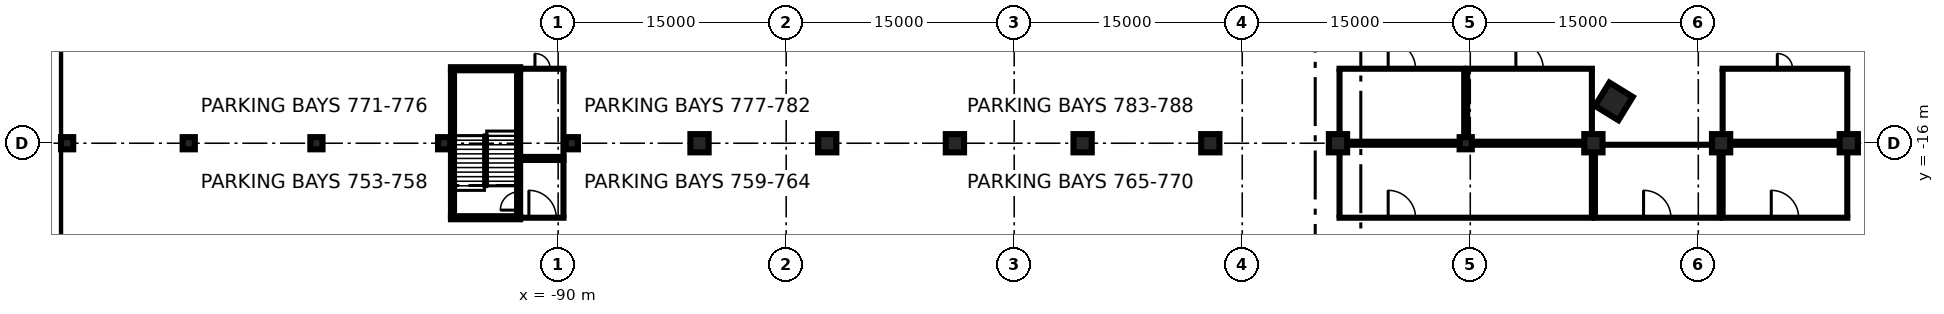
"""IFC4 building model, lengths in metres.
Left out: names, types, materials, properties, quantities, classifications, styles, units other than length and angle.
Written with IfcOpenShell. Run it as: python <this file> out.ifc"""

import sys

from ifc_helpers import new_model, si_unit, direction, frame, frame_2d, origin, origin_2d, place, context, subcontext, project, spatial, rectangle, extrude, element, fill, save


model = new_model("IFC4")
c1 = context("Model", 3, precision=1e-05, world=origin(), true_north=direction((0.0, 1.0)))
c2 = subcontext(c1, "Body", "Model", "MODEL_VIEW")
j1 = project(units=[si_unit("LENGTHUNIT", "METRE"), si_unit("PLANEANGLEUNIT", "RADIAN")], contexts=[c1])
p1 = place(None, origin())
s1 = spatial("IfcSite", under=j1, at=p1, CompositionType="ELEMENT")
p2 = place(p1, origin())
s2 = spatial("IfcBuilding", under=s1, at=p2, CompositionType="ELEMENT")
p3 = place(p2, frame((0.0, 0.0, -12.0)))
s3 = spatial("IfcBuildingStorey", under=s2, at=p3, CompositionType="ELEMENT", Elevation=-12.0)
p4 = place(p3, frame((-123.15, -80.0, 0.0), z_axis=(0.0, 0.0, 1.0), x_axis=(0.0, 1.0, 0.0)))
e1 = element("IfcWall", 1, at=p4, inside=s3, PredefinedType="USERDEFINED", context=c2, shape_type="SweptSolid", body=[
    extrude(rectangle(XDim=160.0, YDim=0.9, at=frame_2d((80.0, 0.0))), origin(), (0.0, 0.0, 1.0), 11.55),
])
p5 = place(p2, frame((0.0, 0.0, -7.2)))
s4 = spatial("IfcBuildingStorey", under=s2, at=p5, CompositionType="ELEMENT", Elevation=-7.2)
p6 = place(p5, frame((-20.552, -13.248, -0.4), z_axis=(0.0, 0.0, 1.0), x_axis=(0.523429826947, 0.85206878611, 0.0)))
e2 = element("IfcColumn", 2, at=p6, inside=s4, PredefinedType="COLUMN", context=c2, shape_type="SweptSolid", body=[
    extrude(rectangle(XDim=1.8, YDim=1.8, at=origin_2d()), origin(), (0.0, 0.0, 1.0), 3.6),
])
for number, where, z_axis, x_axis in (
    (3, (-122.3, -16.0, -0.4), (0.0, 0.0, 1.0), (1.0, 0.0, 0.0)),
    (4, (-114.3, -16.0, -0.4), (0.0, 0.0, 1.0), (1.0, 0.0, 0.0)),
    (5, (-105.9, -16.0, -0.4), (0.0, 0.0, 1.0), (1.0, 0.0, 0.0)),
    (6, (-97.5, -16.0, -0.4), (0.0, 0.0, 1.0), (1.0, 0.0, 0.0)),
    (7, (-89.1, -16.0, -0.4), (0.0, 0.0, 1.0), (1.0, 0.0, 0.0)),
):
    element("IfcColumn", number, at=place(p5, frame(where, z_axis=z_axis, x_axis=x_axis)), inside=s4, PredefinedType="COLUMN", context=c2, shape_type="SweptSolid", body=[
        extrude(rectangle(XDim=0.8, YDim=0.8, at=origin_2d()), origin(), (0.0, 0.0, 1.0), 3.6),
    ])
for number, where, z_axis, x_axis in (
    (8, (-80.7, -16.0, -0.4), (0.0, 0.0, 1.0), (1.0, 0.0, 0.0)),
    (9, (-72.3, -16.0, -0.4), (0.0, 0.0, 1.0), (1.0, 0.0, 0.0)),
    (10, (-63.9, -16.0, -0.4), (0.0, 0.0, 1.0), (1.0, 0.0, 0.0)),
    (11, (-55.5, -16.0, -0.4), (0.0, 0.0, 1.0), (1.0, 0.0, 0.0)),
    (12, (-47.1, -16.0, -0.4), (0.0, 0.0, 1.0), (1.0, 0.0, 0.0)),
    (13, (-38.7, -16.0, -0.4), (0.0, 0.0, 1.0), (1.0, 0.0, 0.0)),
):
    element("IfcColumn", number, at=place(p5, frame(where, z_axis=z_axis, x_axis=x_axis)), inside=s4, PredefinedType="COLUMN", context=c2, shape_type="SweptSolid", body=[
        extrude(rectangle(XDim=1.2, YDim=1.2, at=origin_2d()), origin(), (0.0, 0.0, 1.0), 3.6),
    ])
p7 = place(p5, frame((-30.3, -16.0, -0.4), z_axis=(0.0, 0.0, 1.0), x_axis=(1.0, 0.0, 0.0)))
e14 = element("IfcColumn", 14, at=p7, inside=s4, PredefinedType="COLUMN", context=c2, shape_type="SweptSolid", body=[
    extrude(rectangle(XDim=0.8, YDim=0.8, at=origin_2d()), origin(), (0.0, 0.0, 1.0), 3.6),
])
for number, where, z_axis, x_axis in (
    (15, (-21.9, -16.0, -0.4), (0.0, 0.0, 1.0), (1.0, 0.0, 0.0)),
    (16, (-13.5, -16.0, -0.4), (0.0, 0.0, 1.0), (1.0, 0.0, 0.0)),
    (17, (-5.1, -16.0, -0.4), (0.0, 0.0, 1.0), (1.0, 0.0, 0.0)),
):
    element("IfcColumn", number, at=place(p5, frame(where, z_axis=z_axis, x_axis=x_axis)), inside=s4, PredefinedType="COLUMN", context=c2, shape_type="SweptSolid", body=[
        extrude(rectangle(XDim=1.2, YDim=1.2, at=origin_2d()), origin(), (0.0, 0.0, 1.0), 3.6),
    ])
p8 = place(p5, frame((-38.7, -20.9, 0.0), z_axis=(0.0, 0.0, 1.0), x_axis=(1.0, 0.0, 0.0)))
e18 = element("IfcWall", 18, at=p8, inside=s4, PredefinedType="PARTITIONING", context=c2, shape_type="SweptSolid", body=[
    extrude(rectangle(XDim=16.8, YDim=0.2, at=frame_2d((8.4, 0.0))), origin(), (0.0, 0.0, 1.0), 3.2),
])
p9 = place(p8, frame((3.3, 0.0, 0.0)))
e19 = element("IfcOpeningElement", 19, at=p9, cuts=e18, PredefinedType="OPENING", context=c2, shape_type="SweptSolid", body=[
    extrude(rectangle(XDim=1.8, YDim=2.1, at=frame_2d((0.9, 1.05))), frame((0.0, 0.11, 0.0), z_axis=(0.0, -1.0, 0.0), x_axis=(1.0, 0.0, 0.0)), (0.0, 0.0, 1.0), 0.22),
])
p10 = place(p5, frame((-38.7, -16.1, 0.0), z_axis=(0.0, 0.0, 1.0), x_axis=(1.0, 0.0, 0.0)))
e20 = element("IfcWall", 20, at=p10, inside=s4, PredefinedType="PARTITIONING", context=c2, shape_type="SweptSolid", body=[
    extrude(rectangle(XDim=16.8, YDim=0.2, at=frame_2d((8.4, 0.0))), origin(), (0.0, 0.0, 1.0), 3.2),
])
for number, where, z_axis, x_axis in (
    (21, (-38.6, -20.8, 0.0), (0.0, 0.0, 1.0), (0.0, 1.0, 0.0)),
    (22, (-22.0, -20.8, 0.0), (0.0, 0.0, 1.0), (0.0, 1.0, 0.0)),
):
    element("IfcWall", number, at=place(p5, frame(where, z_axis=z_axis, x_axis=x_axis)), inside=s4, PredefinedType="PARTITIONING", context=c2, shape_type="SweptSolid", body=[
        extrude(rectangle(XDim=4.2, YDim=0.2, at=frame_2d((2.1, 0.0))), origin(), (0.0, 0.0, 1.0), 3.2),
    ])
p11 = place(p5, frame((-21.9, -20.9, 0.0), z_axis=(0.0, 0.0, 1.0), x_axis=(1.0, 0.0, 0.0)))
e23 = element("IfcWall", 23, at=p11, inside=s4, PredefinedType="PARTITIONING", context=c2, shape_type="SweptSolid", body=[
    extrude(rectangle(XDim=8.4, YDim=0.2, at=frame_2d((4.2, 0.0))), origin(), (0.0, 0.0, 1.0), 3.2),
])
p12 = place(p11, frame((3.3, 0.0, 0.0)))
e24 = element("IfcOpeningElement", 24, at=p12, cuts=e23, PredefinedType="OPENING", context=c2, shape_type="SweptSolid", body=[
    extrude(rectangle(XDim=1.8, YDim=2.1, at=frame_2d((0.9, 1.05))), frame((0.0, 0.11, 0.0), z_axis=(0.0, -1.0, 0.0), x_axis=(1.0, 0.0, 0.0)), (0.0, 0.0, 1.0), 0.22),
])
p13 = place(p5, frame((-21.9, -16.1, 0.0), z_axis=(0.0, 0.0, 1.0), x_axis=(1.0, 0.0, 0.0)))
e25 = element("IfcWall", 25, at=p13, inside=s4, PredefinedType="PARTITIONING", context=c2, shape_type="SweptSolid", body=[
    extrude(rectangle(XDim=8.4, YDim=0.2, at=frame_2d((4.2, 0.0))), origin(), (0.0, 0.0, 1.0), 3.2),
])
for number, where, z_axis, x_axis in (
    (26, (-21.8, -20.8, 0.0), (0.0, 0.0, 1.0), (0.0, 1.0, 0.0)),
    (27, (-13.6, -20.8, 0.0), (0.0, 0.0, 1.0), (0.0, 1.0, 0.0)),
):
    element("IfcWall", number, at=place(p5, frame(where, z_axis=z_axis, x_axis=x_axis)), inside=s4, PredefinedType="PARTITIONING", context=c2, shape_type="SweptSolid", body=[
        extrude(rectangle(XDim=4.2, YDim=0.2, at=frame_2d((2.1, 0.0))), origin(), (0.0, 0.0, 1.0), 3.2),
    ])
p14 = place(p5, frame((-13.5, -20.9, 0.0), z_axis=(0.0, 0.0, 1.0), x_axis=(1.0, 0.0, 0.0)))
e28 = element("IfcWall", 28, at=p14, inside=s4, PredefinedType="PARTITIONING", context=c2, shape_type="SweptSolid", body=[
    extrude(rectangle(XDim=8.4, YDim=0.2, at=frame_2d((4.2, 0.0))), origin(), (0.0, 0.0, 1.0), 3.2),
])
p15 = place(p14, frame((3.3, 0.0, 0.0)))
e29 = element("IfcOpeningElement", 29, at=p15, cuts=e28, PredefinedType="OPENING", context=c2, shape_type="SweptSolid", body=[
    extrude(rectangle(XDim=1.8, YDim=2.1, at=frame_2d((0.9, 1.05))), frame((0.0, 0.11, 0.0), z_axis=(0.0, -1.0, 0.0), x_axis=(1.0, 0.0, 0.0)), (0.0, 0.0, 1.0), 0.22),
])
p16 = place(p5, frame((-13.5, -16.1, 0.0), z_axis=(0.0, 0.0, 1.0), x_axis=(1.0, 0.0, 0.0)))
e30 = element("IfcWall", 30, at=p16, inside=s4, PredefinedType="PARTITIONING", context=c2, shape_type="SweptSolid", body=[
    extrude(rectangle(XDim=8.4, YDim=0.2, at=frame_2d((4.2, 0.0))), origin(), (0.0, 0.0, 1.0), 3.2),
])
for number, where, z_axis, x_axis in (
    (31, (-13.4, -20.8, 0.0), (0.0, 0.0, 1.0), (0.0, 1.0, 0.0)),
    (32, (-5.2, -20.8, 0.0), (0.0, 0.0, 1.0), (0.0, 1.0, 0.0)),
):
    element("IfcWall", number, at=place(p5, frame(where, z_axis=z_axis, x_axis=x_axis)), inside=s4, PredefinedType="PARTITIONING", context=c2, shape_type="SweptSolid", body=[
        extrude(rectangle(XDim=4.2, YDim=0.2, at=frame_2d((2.1, 0.0))), origin(), (0.0, 0.0, 1.0), 3.2),
    ])
p17 = place(p5, frame((-38.7, -15.9, 0.0), z_axis=(0.0, 0.0, 1.0), x_axis=(1.0, 0.0, 0.0)))
e33 = element("IfcWall", 33, at=p17, inside=s4, PredefinedType="PARTITIONING", context=c2, shape_type="SweptSolid", body=[
    extrude(rectangle(XDim=8.4, YDim=0.2, at=frame_2d((4.2, 0.0))), origin(), (0.0, 0.0, 1.0), 3.2),
])
p18 = place(p5, frame((-38.7, -11.1, 0.0), z_axis=(0.0, 0.0, 1.0), x_axis=(1.0, 0.0, 0.0)))
e34 = element("IfcWall", 34, at=p18, inside=s4, PredefinedType="PARTITIONING", context=c2, shape_type="SweptSolid", body=[
    extrude(rectangle(XDim=8.4, YDim=0.2, at=frame_2d((4.2, 0.0))), origin(), (0.0, 0.0, 1.0), 3.2),
])
p19 = place(p18, frame((3.3, 0.0, 0.0)))
e35 = element("IfcOpeningElement", 35, at=p19, cuts=e34, PredefinedType="OPENING", context=c2, shape_type="SweptSolid", body=[
    extrude(rectangle(XDim=1.8, YDim=2.1, at=frame_2d((0.9, 1.05))), frame((0.0, 0.11, 0.0), z_axis=(0.0, -1.0, 0.0), x_axis=(1.0, 0.0, 0.0)), (0.0, 0.0, 1.0), 0.22),
])
p20 = place(p5, frame((-38.6, -15.4, 0.0), z_axis=(0.0, 0.0, 1.0), x_axis=(0.0, 1.0, 0.0)))
e36 = element("IfcWall", 36, at=p20, inside=s4, PredefinedType="PARTITIONING", context=c2, shape_type="SweptSolid", body=[
    extrude(rectangle(XDim=4.2, YDim=0.2, at=frame_2d((2.1, 0.0))), origin(), (0.0, 0.0, 1.0), 3.2),
])
p21 = place(p5, frame((-30.4, -15.6, 0.0), z_axis=(0.0, 0.0, 1.0), x_axis=(0.0, 1.0, 0.0)))
e37 = element("IfcWall", 37, at=p21, inside=s4, PredefinedType="PARTITIONING", context=c2, shape_type="SweptSolid", body=[
    extrude(rectangle(XDim=4.4, YDim=0.2, at=frame_2d((2.2, 0.0))), origin(), (0.0, 0.0, 1.0), 3.2),
])
p22 = place(p5, frame((-30.3, -15.9, 0.0), z_axis=(0.0, 0.0, 1.0), x_axis=(1.0, 0.0, 0.0)))
e38 = element("IfcWall", 38, at=p22, inside=s4, PredefinedType="PARTITIONING", context=c2, shape_type="SweptSolid", body=[
    extrude(rectangle(XDim=8.4, YDim=0.2, at=frame_2d((4.2, 0.0))), origin(), (0.0, 0.0, 1.0), 3.2),
])
p23 = place(p5, frame((-30.3, -11.1, 0.0), z_axis=(0.0, 0.0, 1.0), x_axis=(1.0, 0.0, 0.0)))
e39 = element("IfcWall", 39, at=p23, inside=s4, PredefinedType="PARTITIONING", context=c2, shape_type="SweptSolid", body=[
    extrude(rectangle(XDim=8.4, YDim=0.2, at=frame_2d((4.2, 0.0))), origin(), (0.0, 0.0, 1.0), 3.2),
])
p24 = place(p23, frame((3.3, 0.0, 0.0)))
e40 = element("IfcOpeningElement", 40, at=p24, cuts=e39, PredefinedType="OPENING", context=c2, shape_type="SweptSolid", body=[
    extrude(rectangle(XDim=1.8, YDim=2.1, at=frame_2d((0.9, 1.05))), frame((0.0, 0.11, 0.0), z_axis=(0.0, -1.0, 0.0), x_axis=(1.0, 0.0, 0.0)), (0.0, 0.0, 1.0), 0.22),
])
p25 = place(p5, frame((-30.2, -15.6, 0.0), z_axis=(0.0, 0.0, 1.0), x_axis=(0.0, 1.0, 0.0)))
e41 = element("IfcWall", 41, at=p25, inside=s4, PredefinedType="PARTITIONING", context=c2, shape_type="SweptSolid", body=[
    extrude(rectangle(XDim=4.4, YDim=0.2, at=frame_2d((2.2, 0.0))), origin(), (0.0, 0.0, 1.0), 3.2),
])
p26 = place(p5, frame((-22.0, -15.4, 0.0), z_axis=(0.0, 0.0, 1.0), x_axis=(0.0, 1.0, 0.0)))
e42 = element("IfcWall", 42, at=p26, inside=s4, PredefinedType="PARTITIONING", context=c2, shape_type="SweptSolid", body=[
    extrude(rectangle(XDim=4.2, YDim=0.2, at=frame_2d((2.1, 0.0))), origin(), (0.0, 0.0, 1.0), 3.2),
])
p27 = place(p5, frame((-13.5, -15.9, 0.0), z_axis=(0.0, 0.0, 1.0), x_axis=(1.0, 0.0, 0.0)))
e43 = element("IfcWall", 43, at=p27, inside=s4, PredefinedType="PARTITIONING", context=c2, shape_type="SweptSolid", body=[
    extrude(rectangle(XDim=8.4, YDim=0.2, at=frame_2d((4.2, 0.0))), origin(), (0.0, 0.0, 1.0), 3.2),
])
p28 = place(p5, frame((-13.5, -11.1, 0.0), z_axis=(0.0, 0.0, 1.0), x_axis=(1.0, 0.0, 0.0)))
e44 = element("IfcWall", 44, at=p28, inside=s4, PredefinedType="PARTITIONING", context=c2, shape_type="SweptSolid", body=[
    extrude(rectangle(XDim=8.4, YDim=0.2, at=frame_2d((4.2, 0.0))), origin(), (0.0, 0.0, 1.0), 3.2),
])
p29 = place(p28, frame((3.7, 0.0, 0.0)))
e45 = element("IfcOpeningElement", 45, at=p29, cuts=e44, PredefinedType="OPENING", context=c2, shape_type="SweptSolid", body=[
    extrude(rectangle(XDim=1.0, YDim=2.1, at=frame_2d((0.5, 1.05))), frame((0.0, 0.11, 0.0), z_axis=(0.0, -1.0, 0.0), x_axis=(1.0, 0.0, 0.0)), (0.0, 0.0, 1.0), 0.22),
])
for number, where, z_axis, x_axis in (
    (46, (-13.4, -15.4, 0.0), (0.0, 0.0, 1.0), (0.0, 1.0, 0.0)),
    (47, (-5.2, -15.4, 0.0), (0.0, 0.0, 1.0), (0.0, 1.0, 0.0)),
):
    element("IfcWall", number, at=place(p5, frame(where, z_axis=z_axis, x_axis=x_axis)), inside=s4, PredefinedType="PARTITIONING", context=c2, shape_type="SweptSolid", body=[
        extrude(rectangle(XDim=4.2, YDim=0.2, at=frame_2d((2.1, 0.0))), origin(), (0.0, 0.0, 1.0), 3.2),
    ])
p30 = place(p5, frame((-92.5, -20.9, 0.0), z_axis=(0.0, 0.0, 1.0), x_axis=(1.0, 0.0, 0.0)))
e48 = element("IfcWall", 48, at=p30, inside=s4, PredefinedType="PARTITIONING", context=c2, shape_type="SweptSolid", body=[
    extrude(rectangle(XDim=2.95, YDim=0.2, at=frame_2d((1.475, 0.0))), origin(), (0.0, 0.0, 1.0), 3.2),
])
p31 = place(p30, frame((0.575, 0.0, 0.0)))
e49 = element("IfcOpeningElement", 49, at=p31, cuts=e48, PredefinedType="OPENING", context=c2, shape_type="SweptSolid", body=[
    extrude(rectangle(XDim=1.8, YDim=2.1, at=frame_2d((0.9, 1.05))), frame((0.0, 0.11, 0.0), z_axis=(0.0, -1.0, 0.0), x_axis=(1.0, 0.0, 0.0)), (0.0, 0.0, 1.0), 0.22),
])
p32 = place(p5, frame((-92.5, -17.1, 0.0), z_axis=(0.0, 0.0, 1.0), x_axis=(1.0, 0.0, 0.0)))
e50 = element("IfcWall", 50, at=p32, inside=s4, PredefinedType="PARTITIONING", context=c2, shape_type="SweptSolid", body=[
    extrude(rectangle(XDim=2.95, YDim=0.2, at=frame_2d((1.475, 0.0))), origin(), (0.0, 0.0, 1.0), 3.2),
])
p33 = place(p5, frame((-89.65, -20.8, 0.0), z_axis=(0.0, 0.0, 1.0), x_axis=(0.0, 1.0, 0.0)))
e51 = element("IfcWall", 51, at=p33, inside=s4, PredefinedType="PARTITIONING", context=c2, shape_type="SweptSolid", body=[
    extrude(rectangle(XDim=3.6, YDim=0.2, at=frame_2d((1.8, 0.0))), origin(), (0.0, 0.0, 1.0), 3.2),
])
p34 = place(p5, frame((-92.5, -16.9, 0.0), z_axis=(0.0, 0.0, 1.0), x_axis=(1.0, 0.0, 0.0)))
e52 = element("IfcWall", 52, at=p34, inside=s4, PredefinedType="PARTITIONING", context=c2, shape_type="SweptSolid", body=[
    extrude(rectangle(XDim=2.95, YDim=0.2, at=frame_2d((1.475, 0.0))), origin(), (0.0, 0.0, 1.0), 3.2),
])
p35 = place(p5, frame((-92.5, -11.1, 0.0), z_axis=(0.0, 0.0, 1.0), x_axis=(1.0, 0.0, 0.0)))
e53 = element("IfcWall", 53, at=p35, inside=s4, PredefinedType="PARTITIONING", context=c2, shape_type="SweptSolid", body=[
    extrude(rectangle(XDim=2.95, YDim=0.2, at=frame_2d((1.475, 0.0))), origin(), (0.0, 0.0, 1.0), 3.2),
])
p36 = place(p35, frame((0.975, 0.0, 0.0)))
e54 = element("IfcOpeningElement", 54, at=p36, cuts=e53, PredefinedType="OPENING", context=c2, shape_type="SweptSolid", body=[
    extrude(rectangle(XDim=1.0, YDim=2.1, at=frame_2d((0.5, 1.05))), frame((0.0, 0.11, 0.0), z_axis=(0.0, -1.0, 0.0), x_axis=(1.0, 0.0, 0.0)), (0.0, 0.0, 1.0), 0.22),
])
p37 = place(p5, frame((-89.65, -16.8, 0.0), z_axis=(0.0, 0.0, 1.0), x_axis=(0.0, 1.0, 0.0)))
e55 = element("IfcWall", 55, at=p37, inside=s4, PredefinedType="PARTITIONING", context=c2, shape_type="SweptSolid", body=[
    extrude(rectangle(XDim=5.6, YDim=0.2, at=frame_2d((2.8, 0.0))), origin(), (0.0, 0.0, 1.0), 3.2),
])
p38 = place(p5, frame((-96.95, -20.8, 0.0), z_axis=(0.0, 0.0, 1.0), x_axis=(0.0, 1.0, 0.0)))
e56 = element("IfcWall", 56, at=p38, inside=s4, PredefinedType="SOLIDWALL", context=c2, shape_type="SweptSolid", body=[
    extrude(rectangle(XDim=9.6, YDim=0.2, at=frame_2d((4.8, 0.0))), origin(), (0.0, 0.0, 1.0), 3.2),
])
p39 = place(p5, frame((-92.6, -20.8, 0.0), z_axis=(0.0, 0.0, 1.0), x_axis=(0.0, 1.0, 0.0)))
e57 = element("IfcWall", 57, at=p39, inside=s4, PredefinedType="SOLIDWALL", context=c2, shape_type="SweptSolid", body=[
    extrude(rectangle(XDim=9.6, YDim=0.2, at=frame_2d((4.8, 0.0))), origin(), (0.0, 0.0, 1.0), 3.2),
])
p40 = place(p39, frame((0.4, 0.0, 0.0)))
e58 = element("IfcOpeningElement", 58, at=p40, cuts=e57, PredefinedType="OPENING", context=c2, shape_type="SweptSolid", body=[
    extrude(rectangle(XDim=1.2, YDim=2.1, at=frame_2d((0.6, 1.05))), frame((0.0, 0.11, 0.0), z_axis=(0.0, -1.0, 0.0), x_axis=(1.0, 0.0, 0.0)), (0.0, 0.0, 1.0), 0.22),
])
for number, where, z_axis, x_axis in (
    (59, (-92.5, -20.9, 0.0), (0.0, 0.0, 1.0), (-1.0, 0.0, 0.0)),
    (60, (-97.05, -11.1, 0.0), (0.0, 0.0, 1.0), (1.0, 0.0, 0.0)),
):
    element("IfcWall", number, at=place(p5, frame(where, z_axis=z_axis, x_axis=x_axis)), inside=s4, PredefinedType="SOLIDWALL", context=c2, shape_type="SweptSolid", body=[
        extrude(rectangle(XDim=4.55, YDim=0.2, at=frame_2d((2.275, 0.0))), origin(), (0.0, 0.0, 1.0), 3.2),
    ])
p41 = place(p9, origin())
e61 = element("IfcDoor", 61, at=p41, inside=s4, OperationType="DOUBLE_DOOR_SINGLE_SWING", PredefinedType="DOOR", context=c2, shape_type="SweptSolid", body=[
    extrude(rectangle(XDim=1.8, YDim=2.1, at=frame_2d((0.9, 1.05))), frame((0.0, 0.025, 0.0), z_axis=(0.0, -1.0, 0.0), x_axis=(1.0, 0.0, 0.0)), (0.0, 0.0, 1.0), 0.05),
])
fill(e19, e61)
p42 = place(p12, origin())
e62 = element("IfcDoor", 62, at=p42, inside=s4, OperationType="DOUBLE_DOOR_SINGLE_SWING", PredefinedType="DOOR", context=c2, shape_type="SweptSolid", body=[
    extrude(rectangle(XDim=1.8, YDim=2.1, at=frame_2d((0.9, 1.05))), frame((0.0, 0.025, 0.0), z_axis=(0.0, -1.0, 0.0), x_axis=(1.0, 0.0, 0.0)), (0.0, 0.0, 1.0), 0.05),
])
fill(e24, e62)
p43 = place(p15, origin())
e63 = element("IfcDoor", 63, at=p43, inside=s4, OperationType="DOUBLE_DOOR_SINGLE_SWING", PredefinedType="DOOR", context=c2, shape_type="SweptSolid", body=[
    extrude(rectangle(XDim=1.8, YDim=2.1, at=frame_2d((0.9, 1.05))), frame((0.0, 0.025, 0.0), z_axis=(0.0, -1.0, 0.0), x_axis=(1.0, 0.0, 0.0)), (0.0, 0.0, 1.0), 0.05),
])
fill(e29, e63)
p44 = place(p19, origin())
e64 = element("IfcDoor", 64, at=p44, inside=s4, OperationType="DOUBLE_DOOR_SINGLE_SWING", PredefinedType="DOOR", context=c2, shape_type="SweptSolid", body=[
    extrude(rectangle(XDim=1.8, YDim=2.1, at=frame_2d((0.9, 1.05))), frame((0.0, 0.025, 0.0), z_axis=(0.0, -1.0, 0.0), x_axis=(1.0, 0.0, 0.0)), (0.0, 0.0, 1.0), 0.05),
])
fill(e35, e64)
p45 = place(p24, origin())
e65 = element("IfcDoor", 65, at=p45, inside=s4, OperationType="DOUBLE_DOOR_SINGLE_SWING", PredefinedType="DOOR", context=c2, shape_type="SweptSolid", body=[
    extrude(rectangle(XDim=1.8, YDim=2.1, at=frame_2d((0.9, 1.05))), frame((0.0, 0.025, 0.0), z_axis=(0.0, -1.0, 0.0), x_axis=(1.0, 0.0, 0.0)), (0.0, 0.0, 1.0), 0.05),
])
fill(e40, e65)
p46 = place(p29, origin())
e66 = element("IfcDoor", 66, at=p46, inside=s4, OperationType="SINGLE_SWING_LEFT", PredefinedType="DOOR", context=c2, shape_type="SweptSolid", body=[
    extrude(rectangle(XDim=1.0, YDim=2.1, at=frame_2d((0.5, 1.05))), frame((0.0, 0.025, 0.0), z_axis=(0.0, -1.0, 0.0), x_axis=(1.0, 0.0, 0.0)), (0.0, 0.0, 1.0), 0.05),
])
fill(e45, e66)
p47 = place(p31, origin())
e67 = element("IfcDoor", 67, at=p47, inside=s4, OperationType="DOUBLE_DOOR_SINGLE_SWING", PredefinedType="DOOR", context=c2, shape_type="SweptSolid", body=[
    extrude(rectangle(XDim=1.8, YDim=2.1, at=frame_2d((0.9, 1.05))), frame((0.0, 0.025, 0.0), z_axis=(0.0, -1.0, 0.0), x_axis=(1.0, 0.0, 0.0)), (0.0, 0.0, 1.0), 0.05),
])
fill(e49, e67)
p48 = place(p36, origin())
e68 = element("IfcDoor", 68, at=p48, inside=s4, OperationType="SINGLE_SWING_LEFT", PredefinedType="DOOR", context=c2, shape_type="SweptSolid", body=[
    extrude(rectangle(XDim=1.0, YDim=2.1, at=frame_2d((0.5, 1.05))), frame((0.0, 0.025, 0.0), z_axis=(0.0, -1.0, 0.0), x_axis=(1.0, 0.0, 0.0)), (0.0, 0.0, 1.0), 0.05),
])
fill(e54, e68)
p49 = place(p40, origin())
e69 = element("IfcDoor", 69, at=p49, inside=s4, OperationType="SINGLE_SWING_LEFT", PredefinedType="DOOR", context=c2, shape_type="SweptSolid", body=[
    extrude(rectangle(XDim=1.2, YDim=2.1, at=frame_2d((0.6, 1.05))), frame((0.0, 0.025, 0.0), z_axis=(0.0, -1.0, 0.0), x_axis=(1.0, 0.0, 0.0)), (0.0, 0.0, 1.0), 0.05),
])
fill(e58, e69)
save(model, sys.argv[1])
